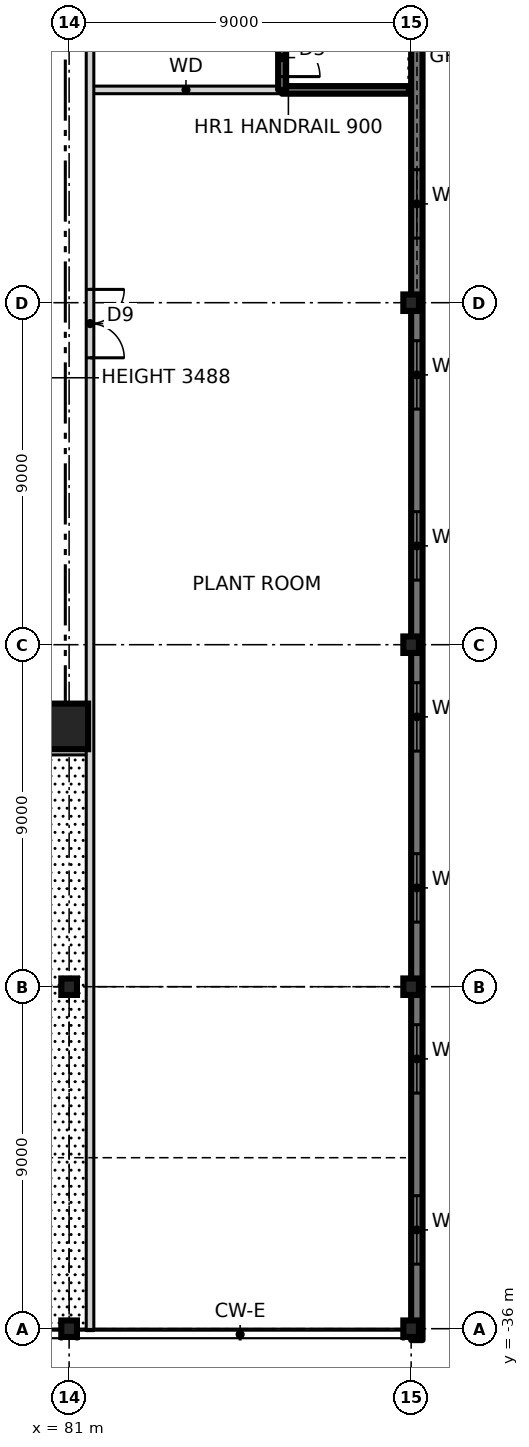
"""IFC4 building model, lengths in metres.
Left out: names, types, materials, properties, quantities, classifications, styles, units other than length and angle.
Written with IfcOpenShell. Run it as: python <this file> out.ifc"""

import sys

from ifc_helpers import new_model, si_unit, direction, frame, frame_2d, origin, origin_2d, place, context, subcontext, project, spatial, rectangle, hollow_rectangle, i_section, extrude, element, fill, save


model = new_model("IFC4")
c1 = context("Model", 3, precision=1e-05, world=origin(), true_north=direction((0.0, 1.0)))
c2 = subcontext(c1, "Body", "Model", "MODEL_VIEW")
j1 = project(units=[si_unit("LENGTHUNIT", "METRE"), si_unit("PLANEANGLEUNIT", "RADIAN")], contexts=[c1])
p1 = place(None, origin())
s1 = spatial("IfcSite", under=j1, at=p1, CompositionType="ELEMENT")
p2 = place(p1, origin())
s2 = spatial("IfcBuilding", under=s1, at=p2, CompositionType="ELEMENT")
p3 = place(p2, frame((0.0, 0.0, 6.0)))
s3 = spatial("IfcBuildingStorey", under=s2, at=p3, CompositionType="ELEMENT", Elevation=6.0)
p4 = place(p3, frame((80.9, -20.15, 0.0), z_axis=(0.0, 0.0, 1.0), x_axis=(1.0, 0.0, 0.0)))
e1 = element("IfcColumn", 1, at=p4, inside=s3, PredefinedType="COLUMN", context=c2, shape_type="SweptSolid", body=[
    extrude(hollow_rectangle(XDim=1.2, YDim=1.2, WallThickness=0.07, at=origin_2d()), origin(), (0.0, 0.0, 1.0), 4.5),
])
for number, where, z_axis, x_axis in (
    (2, (81.0, -36.0, 0.0), (0.0, 0.0, 1.0), (1.0, 0.0, 0.0)),
    (3, (81.0, -27.0, 0.0), (0.0, 0.0, 1.0), (1.0, 0.0, 0.0)),
    (4, (90.0, -36.0, 0.0), (0.0, 0.0, 1.0), (1.0, 0.0, 0.0)),
    (5, (90.0, -27.0, 0.0), (0.0, 0.0, 1.0), (1.0, 0.0, 0.0)),
    (6, (90.0, -18.0, 0.0), (0.0, 0.0, 1.0), (1.0, 0.0, 0.0)),
    (7, (90.0, -9.0, 0.0), (0.0, 0.0, 1.0), (1.0, 0.0, 0.0)),
):
    element("IfcColumn", number, at=place(p3, frame(where, z_axis=z_axis, x_axis=x_axis)), inside=s3, PredefinedType="COLUMN", context=c2, shape_type="SweptSolid", body=[
        extrude(i_section(OverallWidth=0.411, OverallDepth=0.434, WebThickness=0.036, FlangeThickness=0.057, at=origin_2d()), origin(), (0.0, 0.0, 1.0), 4.5),
    ])
p5 = place(p3, frame((90.15, -36.3, -0.25), z_axis=(0.0, 0.0, 1.0), x_axis=(0.0, 1.0, 0.0)))
e8 = element("IfcWall", 8, at=p5, inside=s3, PredefinedType="SOLIDWALL", context=c2, shape_type="SweptSolid", body=[
    extrude(rectangle(XDim=72.6, YDim=0.3, at=frame_2d((36.3, 0.0))), origin(), (0.0, 0.0, 1.0), 3.73),
])
p6 = place(p5, frame((2.0, 0.0, 1.15)))
e9 = element("IfcOpeningElement", 9, at=p6, cuts=e8, PredefinedType="OPENING", context=c2, shape_type="SweptSolid", body=[
    extrude(rectangle(XDim=1.8, YDim=2.4, at=frame_2d((0.9, 1.2))), frame((0.0, 0.16, 0.0), z_axis=(0.0, -1.0, 0.0), x_axis=(1.0, 0.0, 0.0)), (0.0, 0.0, 1.0), 0.32),
])
p7 = place(p5, frame((6.5, 0.0, 1.15)))
e10 = element("IfcOpeningElement", 10, at=p7, cuts=e8, PredefinedType="OPENING", context=c2, shape_type="SweptSolid", body=[
    extrude(rectangle(XDim=1.8, YDim=2.4, at=frame_2d((0.9, 1.2))), frame((0.0, 0.16, 0.0), z_axis=(0.0, -1.0, 0.0), x_axis=(1.0, 0.0, 0.0)), (0.0, 0.0, 1.0), 0.32),
])
p8 = place(p5, frame((11.0, 0.0, 1.15)))
e11 = element("IfcOpeningElement", 11, at=p8, cuts=e8, PredefinedType="OPENING", context=c2, shape_type="SweptSolid", body=[
    extrude(rectangle(XDim=1.8, YDim=2.4, at=frame_2d((0.9, 1.2))), frame((0.0, 0.16, 0.0), z_axis=(0.0, -1.0, 0.0), x_axis=(1.0, 0.0, 0.0)), (0.0, 0.0, 1.0), 0.32),
])
p9 = place(p5, frame((15.5, 0.0, 1.15)))
e12 = element("IfcOpeningElement", 12, at=p9, cuts=e8, PredefinedType="OPENING", context=c2, shape_type="SweptSolid", body=[
    extrude(rectangle(XDim=1.8, YDim=2.4, at=frame_2d((0.9, 1.2))), frame((0.0, 0.16, 0.0), z_axis=(0.0, -1.0, 0.0), x_axis=(1.0, 0.0, 0.0)), (0.0, 0.0, 1.0), 0.32),
])
p10 = place(p5, frame((20.0, 0.0, 1.15)))
e13 = element("IfcOpeningElement", 13, at=p10, cuts=e8, PredefinedType="OPENING", context=c2, shape_type="SweptSolid", body=[
    extrude(rectangle(XDim=1.8, YDim=2.4, at=frame_2d((0.9, 1.2))), frame((0.0, 0.16, 0.0), z_axis=(0.0, -1.0, 0.0), x_axis=(1.0, 0.0, 0.0)), (0.0, 0.0, 1.0), 0.32),
])
p11 = place(p5, frame((24.5, 0.0, 1.15)))
e14 = element("IfcOpeningElement", 14, at=p11, cuts=e8, PredefinedType="OPENING", context=c2, shape_type="SweptSolid", body=[
    extrude(rectangle(XDim=1.8, YDim=2.4, at=frame_2d((0.9, 1.2))), frame((0.0, 0.16, 0.0), z_axis=(0.0, -1.0, 0.0), x_axis=(1.0, 0.0, 0.0)), (0.0, 0.0, 1.0), 0.32),
])
p12 = place(p5, frame((29.0, 0.0, 1.15)))
e15 = element("IfcOpeningElement", 15, at=p12, cuts=e8, PredefinedType="OPENING", context=c2, shape_type="SweptSolid", body=[
    extrude(rectangle(XDim=1.8, YDim=2.4, at=frame_2d((0.9, 1.2))), frame((0.0, 0.16, 0.0), z_axis=(0.0, -1.0, 0.0), x_axis=(1.0, 0.0, 0.0)), (0.0, 0.0, 1.0), 0.32),
])
p13 = place(p5, frame((42.5, 0.0, 1.15)))
e16 = element("IfcOpeningElement", 16, at=p13, cuts=e8, PredefinedType="OPENING", context=c2, shape_type="SweptSolid", body=[
    extrude(rectangle(XDim=1.8, YDim=2.4, at=frame_2d((0.9, 1.2))), frame((0.0, 0.16, 0.0), z_axis=(0.0, -1.0, 0.0), x_axis=(1.0, 0.0, 0.0)), (0.0, 0.0, 1.0), 0.32),
])
p14 = place(p5, frame((47.0, 0.0, 1.15)))
e17 = element("IfcOpeningElement", 17, at=p14, cuts=e8, PredefinedType="OPENING", context=c2, shape_type="SweptSolid", body=[
    extrude(rectangle(XDim=1.8, YDim=2.4, at=frame_2d((0.9, 1.2))), frame((0.0, 0.16, 0.0), z_axis=(0.0, -1.0, 0.0), x_axis=(1.0, 0.0, 0.0)), (0.0, 0.0, 1.0), 0.32),
])
p15 = place(p5, frame((51.5, 0.0, 1.15)))
e18 = element("IfcOpeningElement", 18, at=p15, cuts=e8, PredefinedType="OPENING", context=c2, shape_type="SweptSolid", body=[
    extrude(rectangle(XDim=1.8, YDim=2.4, at=frame_2d((0.9, 1.2))), frame((0.0, 0.16, 0.0), z_axis=(0.0, -1.0, 0.0), x_axis=(1.0, 0.0, 0.0)), (0.0, 0.0, 1.0), 0.32),
])
p16 = place(p5, frame((56.0, 0.0, 1.15)))
e19 = element("IfcOpeningElement", 19, at=p16, cuts=e8, PredefinedType="OPENING", context=c2, shape_type="SweptSolid", body=[
    extrude(rectangle(XDim=1.8, YDim=2.4, at=frame_2d((0.9, 1.2))), frame((0.0, 0.16, 0.0), z_axis=(0.0, -1.0, 0.0), x_axis=(1.0, 0.0, 0.0)), (0.0, 0.0, 1.0), 0.32),
])
p17 = place(p5, frame((60.5, 0.0, 1.15)))
e20 = element("IfcOpeningElement", 20, at=p17, cuts=e8, PredefinedType="OPENING", context=c2, shape_type="SweptSolid", body=[
    extrude(rectangle(XDim=1.8, YDim=2.4, at=frame_2d((0.9, 1.2))), frame((0.0, 0.16, 0.0), z_axis=(0.0, -1.0, 0.0), x_axis=(1.0, 0.0, 0.0)), (0.0, 0.0, 1.0), 0.32),
])
p18 = place(p5, frame((65.0, 0.0, 1.15)))
e21 = element("IfcOpeningElement", 21, at=p18, cuts=e8, PredefinedType="OPENING", context=c2, shape_type="SweptSolid", body=[
    extrude(rectangle(XDim=1.8, YDim=2.4, at=frame_2d((0.9, 1.2))), frame((0.0, 0.16, 0.0), z_axis=(0.0, -1.0, 0.0), x_axis=(1.0, 0.0, 0.0)), (0.0, 0.0, 1.0), 0.32),
])
p19 = place(p5, frame((69.5, 0.0, 1.15)))
e22 = element("IfcOpeningElement", 22, at=p19, cuts=e8, PredefinedType="OPENING", context=c2, shape_type="SweptSolid", body=[
    extrude(rectangle(XDim=1.8, YDim=2.4, at=frame_2d((0.9, 1.2))), frame((0.0, 0.16, 0.0), z_axis=(0.0, -1.0, 0.0), x_axis=(1.0, 0.0, 0.0)), (0.0, 0.0, 1.0), 0.32),
])
p20 = place(p3, frame((44.45, -20.8, 0.0), z_axis=(0.0, 0.0, 1.0), x_axis=(1.0, 0.0, 0.0)))
e23 = element("IfcWall", 23, at=p20, inside=s3, PredefinedType="SOLIDWALL", context=c2, shape_type="SweptSolid", body=[
    extrude(rectangle(XDim=37.1, YDim=0.2, at=frame_2d((18.55, 0.0))), origin(), (0.0, 0.0, 1.0), 4.25),
])
p21 = place(p20, frame((2.575, 0.0, 0.0)))
e24 = element("IfcOpeningElement", 24, at=p21, cuts=e23, PredefinedType="OPENING", context=c2, shape_type="SweptSolid", body=[
    extrude(rectangle(XDim=1.8, YDim=2.1, at=frame_2d((0.9, 1.05))), frame((0.0, 0.11, 0.0), z_axis=(0.0, -1.0, 0.0), x_axis=(1.0, 0.0, 0.0)), (0.0, 0.0, 1.0), 0.22),
])
p22 = place(p20, frame((24.125, 0.0, 0.0)))
e25 = element("IfcOpeningElement", 25, at=p22, cuts=e23, PredefinedType="OPENING", context=c2, shape_type="SweptSolid", body=[
    extrude(rectangle(XDim=1.8, YDim=2.1, at=frame_2d((0.9, 1.05))), frame((0.0, 0.11, 0.0), z_axis=(0.0, -1.0, 0.0), x_axis=(1.0, 0.0, 0.0)), (0.0, 0.0, 1.0), 0.22),
])
p23 = place(p20, frame((10.35, 0.0, 0.0)))
e26 = element("IfcOpeningElement", 26, at=p23, cuts=e23, PredefinedType="OPENING", context=c2, shape_type="SweptSolid", body=[
    extrude(rectangle(XDim=1.8, YDim=2.1, at=frame_2d((0.9, 1.05))), frame((0.0, 0.11, 0.0), z_axis=(0.0, -1.0, 0.0), x_axis=(1.0, 0.0, 0.0)), (0.0, 0.0, 1.0), 0.22),
])
p24 = place(p3, frame((81.55, -3.4, 0.0), z_axis=(0.0, 0.0, 1.0), x_axis=(1.0, 0.0, 0.0)))
e27 = element("IfcWall", 27, at=p24, inside=s3, PredefinedType="SOLIDWALL", context=c2, shape_type="SweptSolid", body=[
    extrude(rectangle(XDim=5.05, YDim=0.2, at=frame_2d((2.525, 0.0))), origin(), (0.0, 0.0, 1.0), 4.25),
])
p25 = place(p3, frame((86.6, -3.4, 0.0), z_axis=(0.0, 0.0, 1.0), x_axis=(1.0, 0.0, 0.0)))
e28 = element("IfcWall", 28, at=p25, inside=s3, PredefinedType="SOLIDWALL", context=c2, shape_type="SweptSolid", body=[
    extrude(rectangle(XDim=3.34, YDim=0.2, at=frame_2d((1.67, 0.0))), origin(), (0.0, 0.0, 1.0), 4.5),
])
p26 = place(p3, frame((86.6, -3.4, 0.0), z_axis=(0.0, 0.0, 1.0), x_axis=(0.0, 1.0, 0.0)))
e29 = element("IfcWall", 29, at=p26, inside=s3, PredefinedType="SOLIDWALL", context=c2, shape_type="SweptSolid", body=[
    extrude(rectangle(XDim=7.4, YDim=0.2, at=frame_2d((3.7, 0.0))), origin(), (0.0, 0.0, 1.0), 4.5),
])
p27 = place(p26, frame((0.35, 0.0, 0.0)))
e30 = element("IfcOpeningElement", 30, at=p27, cuts=e29, PredefinedType="OPENING", context=c2, shape_type="SweptSolid", body=[
    extrude(rectangle(XDim=1.0, YDim=2.1, at=frame_2d((0.5, 1.05))), frame((0.0, 0.11, 0.0), z_axis=(0.0, -1.0, 0.0), x_axis=(1.0, 0.0, 0.0)), (0.0, 0.0, 1.0), 0.22),
])
p28 = place(p3, frame((81.55, -36.05, 0.0), z_axis=(0.0, 0.0, 1.0), x_axis=(0.0, 1.0, 0.0)))
e31 = element("IfcWall", 31, at=p28, inside=s3, PredefinedType="SOLIDWALL", context=c2, shape_type="SweptSolid", body=[
    extrude(rectangle(XDim=72.1, YDim=0.2, at=frame_2d((36.05, 0.0))), origin(), (0.0, 0.0, 1.0), 4.25),
])
p29 = place(p28, frame((66.65, 0.0, 0.0)))
e32 = element("IfcOpeningElement", 32, at=p29, cuts=e31, PredefinedType="OPENING", context=c2, shape_type="SweptSolid", body=[
    extrude(rectangle(XDim=1.8, YDim=2.1, at=frame_2d((0.9, 1.05))), frame((0.0, 0.11, 0.0), z_axis=(0.0, -1.0, 0.0), x_axis=(1.0, 0.0, 0.0)), (0.0, 0.0, 1.0), 0.22),
])
p30 = place(p28, frame((25.6, 0.0, 0.0)))
e33 = element("IfcOpeningElement", 33, at=p30, cuts=e31, PredefinedType="OPENING", context=c2, shape_type="SweptSolid", body=[
    extrude(rectangle(XDim=1.8, YDim=2.1, at=frame_2d((0.9, 1.05))), frame((0.0, 0.11, 0.0), z_axis=(0.0, -1.0, 0.0), x_axis=(1.0, 0.0, 0.0)), (0.0, 0.0, 1.0), 0.22),
])
p31 = place(p28, frame((35.45, 0.0, 0.0)))
e34 = element("IfcOpeningElement", 34, at=p31, cuts=e31, PredefinedType="OPENING", context=c2, shape_type="SweptSolid", body=[
    extrude(rectangle(XDim=1.8, YDim=2.1, at=frame_2d((0.9, 1.05))), frame((0.0, 0.11, 0.0), z_axis=(0.0, -1.0, 0.0), x_axis=(1.0, 0.0, 0.0)), (0.0, 0.0, 1.0), 0.22),
])
p32 = place(p28, frame((50.15, 0.0, 0.0)))
e35 = element("IfcOpeningElement", 35, at=p32, cuts=e31, PredefinedType="OPENING", context=c2, shape_type="SweptSolid", body=[
    extrude(rectangle(XDim=1.8, YDim=2.1, at=frame_2d((0.9, 1.05))), frame((0.0, 0.11, 0.0), z_axis=(0.0, -1.0, 0.0), x_axis=(1.0, 0.0, 0.0)), (0.0, 0.0, 1.0), 0.22),
])
p33 = place(p6, origin())
e36 = element("IfcWindow", 36, at=p33, inside=s3, PartitioningType="SINGLE_PANEL", PredefinedType="WINDOW", context=c2, shape_type="SweptSolid", body=[
    extrude(rectangle(XDim=1.8, YDim=2.4, at=frame_2d((0.9, 1.2))), frame((0.0, 0.03, 0.0), z_axis=(0.0, -1.0, 0.0), x_axis=(1.0, 0.0, 0.0)), (0.0, 0.0, 1.0), 0.06),
])
fill(e9, e36)
p34 = place(p7, origin())
e37 = element("IfcWindow", 37, at=p34, inside=s3, PartitioningType="SINGLE_PANEL", PredefinedType="WINDOW", context=c2, shape_type="SweptSolid", body=[
    extrude(rectangle(XDim=1.8, YDim=2.4, at=frame_2d((0.9, 1.2))), frame((0.0, 0.03, 0.0), z_axis=(0.0, -1.0, 0.0), x_axis=(1.0, 0.0, 0.0)), (0.0, 0.0, 1.0), 0.06),
])
fill(e10, e37)
p35 = place(p8, origin())
e38 = element("IfcWindow", 38, at=p35, inside=s3, PartitioningType="SINGLE_PANEL", PredefinedType="WINDOW", context=c2, shape_type="SweptSolid", body=[
    extrude(rectangle(XDim=1.8, YDim=2.4, at=frame_2d((0.9, 1.2))), frame((0.0, 0.03, 0.0), z_axis=(0.0, -1.0, 0.0), x_axis=(1.0, 0.0, 0.0)), (0.0, 0.0, 1.0), 0.06),
])
fill(e11, e38)
p36 = place(p9, origin())
e39 = element("IfcWindow", 39, at=p36, inside=s3, PartitioningType="SINGLE_PANEL", PredefinedType="WINDOW", context=c2, shape_type="SweptSolid", body=[
    extrude(rectangle(XDim=1.8, YDim=2.4, at=frame_2d((0.9, 1.2))), frame((0.0, 0.03, 0.0), z_axis=(0.0, -1.0, 0.0), x_axis=(1.0, 0.0, 0.0)), (0.0, 0.0, 1.0), 0.06),
])
fill(e12, e39)
p37 = place(p10, origin())
e40 = element("IfcWindow", 40, at=p37, inside=s3, PartitioningType="SINGLE_PANEL", PredefinedType="WINDOW", context=c2, shape_type="SweptSolid", body=[
    extrude(rectangle(XDim=1.8, YDim=2.4, at=frame_2d((0.9, 1.2))), frame((0.0, 0.03, 0.0), z_axis=(0.0, -1.0, 0.0), x_axis=(1.0, 0.0, 0.0)), (0.0, 0.0, 1.0), 0.06),
])
fill(e13, e40)
p38 = place(p11, origin())
e41 = element("IfcWindow", 41, at=p38, inside=s3, PartitioningType="SINGLE_PANEL", PredefinedType="WINDOW", context=c2, shape_type="SweptSolid", body=[
    extrude(rectangle(XDim=1.8, YDim=2.4, at=frame_2d((0.9, 1.2))), frame((0.0, 0.03, 0.0), z_axis=(0.0, -1.0, 0.0), x_axis=(1.0, 0.0, 0.0)), (0.0, 0.0, 1.0), 0.06),
])
fill(e14, e41)
p39 = place(p12, origin())
e42 = element("IfcWindow", 42, at=p39, inside=s3, PartitioningType="SINGLE_PANEL", PredefinedType="WINDOW", context=c2, shape_type="SweptSolid", body=[
    extrude(rectangle(XDim=1.8, YDim=2.4, at=frame_2d((0.9, 1.2))), frame((0.0, 0.03, 0.0), z_axis=(0.0, -1.0, 0.0), x_axis=(1.0, 0.0, 0.0)), (0.0, 0.0, 1.0), 0.06),
])
fill(e15, e42)
p40 = place(p30, frame((1.8, 0.0, 0.0), z_axis=(0.0, 0.0, 1.0), x_axis=(-1.0, 0.0, 0.0)))
e43 = element("IfcDoor", 43, at=p40, inside=s3, OperationType="DOUBLE_DOOR_SINGLE_SWING", PredefinedType="DOOR", context=c2, shape_type="SweptSolid", body=[
    extrude(rectangle(XDim=1.8, YDim=2.1, at=frame_2d((0.9, 1.05))), frame((0.0, 0.025, 0.0), z_axis=(0.0, -1.0, 0.0), x_axis=(1.0, 0.0, 0.0)), (0.0, 0.0, 1.0), 0.05),
])
fill(e33, e43)
p41 = place(p27, frame((1.0, 0.0, 0.0), z_axis=(0.0, 0.0, 1.0), x_axis=(-1.0, 0.0, 0.0)))
e44 = element("IfcDoor", 44, at=p41, inside=s3, OperationType="SINGLE_SWING_RIGHT", PredefinedType="DOOR", context=c2, shape_type="SweptSolid", body=[
    extrude(rectangle(XDim=1.0, YDim=2.1, at=frame_2d((0.5, 1.05))), frame((0.0, 0.025, 0.0), z_axis=(0.0, -1.0, 0.0), x_axis=(1.0, 0.0, 0.0)), (0.0, 0.0, 1.0), 0.05),
])
fill(e30, e44)
save(model, sys.argv[1])
